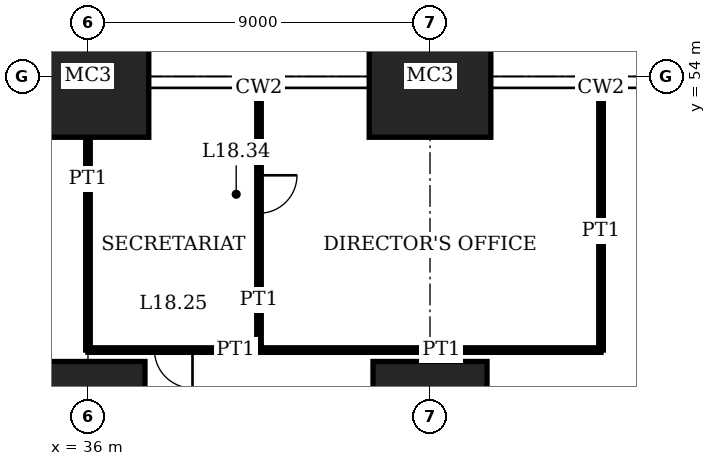
"""IFC4 building model, lengths in metres.
Left out: names, types, materials, properties, quantities, classifications, styles, units other than length and angle.
Written with IfcOpenShell. Run it as: python <this file> out.ifc"""

import sys

from ifc_helpers import new_model, si_unit, direction, frame, frame_2d, origin, origin_2d, place, context, subcontext, project, spatial, rectangle, extrude, element, fill, save


model = new_model("IFC4")
c1 = context("Model", 3, precision=1e-05, world=origin(), true_north=direction((0.0, 1.0)))
c2 = subcontext(c1, "Body", "Model", "MODEL_VIEW")
j1 = project(units=[si_unit("LENGTHUNIT", "METRE"), si_unit("PLANEANGLEUNIT", "RADIAN")], contexts=[c1])
p1 = place(None, origin())
s1 = spatial("IfcSite", under=j1, at=p1, CompositionType="ELEMENT")
p2 = place(p1, origin())
s2 = spatial("IfcBuilding", under=s1, at=p2, CompositionType="ELEMENT")
p3 = place(p2, frame((0.0, 0.0, 75.8)))
s3 = spatial("IfcBuildingStorey", under=s2, at=p3, CompositionType="ELEMENT", Elevation=75.8)
p4 = place(p3, frame((36.0, 45.0, 0.0), z_axis=(0.0, 0.0, 1.0), x_axis=(1.0, 0.0, 0.0)))
e1 = element("IfcColumn", 1, at=p4, inside=s3, PredefinedType="COLUMN", context=c2, shape_type="SweptSolid", body=[
    extrude(rectangle(XDim=3.0, YDim=3.0, at=origin_2d()), origin(), (0.0, 0.0, 1.0), 4.2),
])
p5 = place(p3, frame((36.0, 54.0, 0.0), z_axis=(0.0, 0.0, 1.0), x_axis=(1.0, 0.0, 0.0)))
e2 = element("IfcColumn", 2, at=p5, inside=s3, PredefinedType="COLUMN", context=c2, shape_type="SweptSolid", body=[
    extrude(rectangle(XDim=3.2, YDim=3.2, at=origin_2d()), origin(), (0.0, 0.0, 1.0), 4.2),
])
p6 = place(p3, frame((45.0, 45.0, 0.0), z_axis=(0.0, 0.0, 1.0), x_axis=(1.0, 0.0, 0.0)))
e3 = element("IfcColumn", 3, at=p6, inside=s3, PredefinedType="COLUMN", context=c2, shape_type="SweptSolid", body=[
    extrude(rectangle(XDim=3.0, YDim=3.0, at=origin_2d()), origin(), (0.0, 0.0, 1.0), 4.2),
])
p7 = place(p3, frame((45.0, 54.0, 0.0), z_axis=(0.0, 0.0, 1.0), x_axis=(1.0, 0.0, 0.0)))
e4 = element("IfcColumn", 4, at=p7, inside=s3, PredefinedType="COLUMN", context=c2, shape_type="SweptSolid", body=[
    extrude(rectangle(XDim=3.2, YDim=3.2, at=origin_2d()), origin(), (0.0, 0.0, 1.0), 4.2),
])
p8 = place(p3, frame((36.0, 46.8, 0.0), z_axis=(0.0, 0.0, 1.0), x_axis=(1.0, 0.0, 0.0)))
e5 = element("IfcWall", 5, at=p8, inside=s3, PredefinedType="PARTITIONING", context=c2, shape_type="SweptSolid", body=[
    extrude(rectangle(XDim=4.5, YDim=0.12, at=frame_2d((2.25, 0.0))), origin(), (0.0, 0.0, 1.0), 3.85),
])
p9 = place(p8, frame((1.75, 0.0, 0.0)))
e6 = element("IfcOpeningElement", 6, at=p9, cuts=e5, PredefinedType="OPENING", context=c2, shape_type="SweptSolid", body=[
    extrude(rectangle(XDim=1.0, YDim=2.4, at=frame_2d((0.5, 1.2))), frame((0.0, 0.07, 0.0), z_axis=(0.0, -1.0, 0.0), x_axis=(1.0, 0.0, 0.0)), (0.0, 0.0, 1.0), 0.14),
])
p10 = place(p3, frame((40.5, 46.8, 0.0), z_axis=(0.0, 0.0, 1.0), x_axis=(1.0, 0.0, 0.0)))
e7 = element("IfcWall", 7, at=p10, inside=s3, PredefinedType="PARTITIONING", context=c2, shape_type="SweptSolid", body=[
    extrude(rectangle(XDim=9.0, YDim=0.12, at=frame_2d((4.5, 0.0))), origin(), (0.0, 0.0, 1.0), 3.85),
])
p11 = place(p3, frame((36.0, 46.8, 0.0), z_axis=(0.0, 0.0, 1.0), x_axis=(0.0, 1.0, 0.0)))
e8 = element("IfcWall", 8, at=p11, inside=s3, PredefinedType="PARTITIONING", context=c2, shape_type="SweptSolid", body=[
    extrude(rectangle(XDim=5.6, YDim=0.12, at=frame_2d((2.8, 0.0))), origin(), (0.0, 0.0, 1.0), 3.25),
])
p12 = place(p3, frame((40.5, 46.8, 0.0), z_axis=(0.0, 0.0, 1.0), x_axis=(0.0, 1.0, 0.0)))
e9 = element("IfcWall", 9, at=p12, inside=s3, PredefinedType="PARTITIONING", context=c2, shape_type="SweptSolid", body=[
    extrude(rectangle(XDim=6.89, YDim=0.12, at=frame_2d((3.445, 0.0))), origin(), (0.0, 0.0, 1.0), 3.85),
])
p13 = place(p12, frame((3.6, 0.0, 0.0)))
e10 = element("IfcOpeningElement", 10, at=p13, cuts=e9, PredefinedType="OPENING", context=c2, shape_type="SweptSolid", body=[
    extrude(rectangle(XDim=1.0, YDim=2.4, at=frame_2d((0.5, 1.2))), frame((0.0, 0.07, 0.0), z_axis=(0.0, -1.0, 0.0), x_axis=(1.0, 0.0, 0.0)), (0.0, 0.0, 1.0), 0.14),
])
p14 = place(p3, frame((49.5, 46.8, 0.0), z_axis=(0.0, 0.0, 1.0), x_axis=(0.0, 1.0, 0.0)))
e11 = element("IfcWall", 11, at=p14, inside=s3, PredefinedType="PARTITIONING", context=c2, shape_type="SweptSolid", body=[
    extrude(rectangle(XDim=6.89, YDim=0.12, at=frame_2d((3.445, 0.0))), origin(), (0.0, 0.0, 1.0), 3.85),
])
p15 = place(p9, origin())
e12 = element("IfcDoor", 12, at=p15, inside=s3, OperationType="SINGLE_SWING_RIGHT", PredefinedType="DOOR", context=c2, shape_type="SweptSolid", body=[
    extrude(rectangle(XDim=1.0, YDim=2.4, at=frame_2d((0.5, 1.2))), frame((0.0, 0.025, 0.0), z_axis=(0.0, -1.0, 0.0), x_axis=(1.0, 0.0, 0.0)), (0.0, 0.0, 1.0), 0.05),
])
fill(e6, e12)
p16 = place(p13, origin())
e13 = element("IfcDoor", 13, at=p16, inside=s3, OperationType="SINGLE_SWING_RIGHT", PredefinedType="DOOR", context=c2, shape_type="SweptSolid", body=[
    extrude(rectangle(XDim=1.0, YDim=2.4, at=frame_2d((0.5, 1.2))), frame((0.0, 0.025, 0.0), z_axis=(0.0, -1.0, 0.0), x_axis=(1.0, 0.0, 0.0)), (0.0, 0.0, 1.0), 0.05),
])
fill(e10, e13)
save(model, sys.argv[1])
